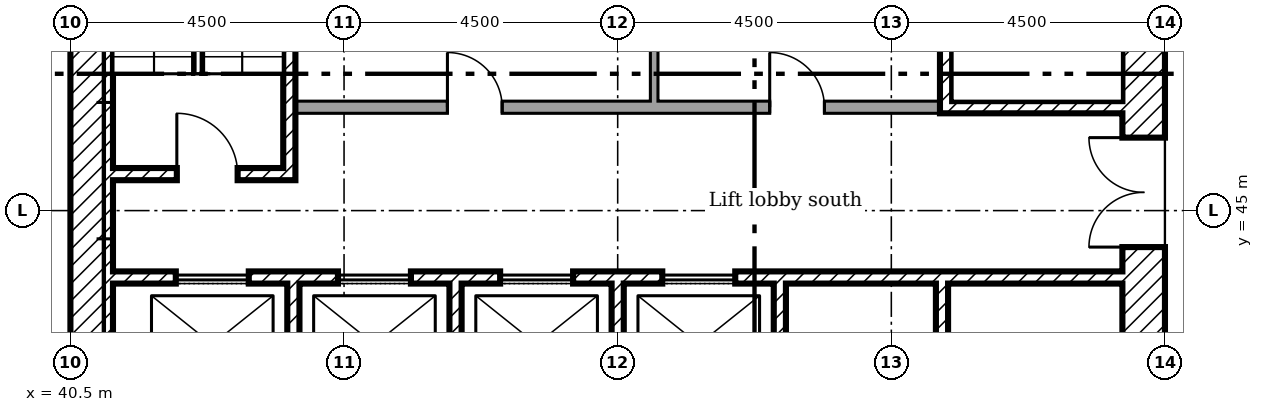
"""IFC4 building model, lengths in metres.
Left out: names, types, materials, properties, quantities, classifications, styles, units other than length and angle.
Written with IfcOpenShell. Run it as: python <this file> out.ifc"""

import sys

from ifc_helpers import new_model, si_unit, direction, frame, frame_2d, origin, place, context, subcontext, project, spatial, rectangle, extrude, element, fill, save


model = new_model("IFC4")
c1 = context("Model", 3, precision=1e-05, world=origin(), true_north=direction((0.0, 1.0)))
c2 = subcontext(c1, "Body", "Model", "MODEL_VIEW")
j1 = project(units=[si_unit("LENGTHUNIT", "METRE"), si_unit("PLANEANGLEUNIT", "RADIAN")], contexts=[c1])
p1 = place(None, origin())
s1 = spatial("IfcSite", under=j1, at=p1, CompositionType="ELEMENT")
p2 = place(p1, origin())
s2 = spatial("IfcBuilding", under=s1, at=p2, CompositionType="ELEMENT")
p3 = place(p2, frame((0.0, 0.0, 120.8)))
s3 = spatial("IfcBuildingStorey", under=s2, at=p3, CompositionType="ELEMENT", Elevation=120.8)
p4 = place(p3, frame((58.15, 40.5, 0.0), z_axis=(0.0, 0.0, 1.0), x_axis=(0.0, 1.0, 0.0)))
e1 = element("IfcWall", 1, at=p4, inside=s3, PredefinedType="SHEAR", context=c2, shape_type="SweptSolid", body=[
    extrude(rectangle(XDim=18.0, YDim=0.7, at=frame_2d((9.0, 0.0))), origin(), (0.0, 0.0, 1.0), 3.35),
])
p5 = place(p4, frame((13.15, 0.0, 0.0)))
e2 = element("IfcOpeningElement", 2, at=p5, cuts=e1, PredefinedType="OPENING", context=c2, shape_type="SweptSolid", body=[
    extrude(rectangle(XDim=1.2, YDim=2.1, at=frame_2d((0.6, 1.05))), frame((0.0, 0.36, 0.0), z_axis=(0.0, -1.0, 0.0), x_axis=(1.0, 0.0, 0.0)), (0.0, 0.0, 1.0), 0.72),
])
p6 = place(p4, frame((3.9, 0.0, 0.0)))
e3 = element("IfcOpeningElement", 3, at=p6, cuts=e1, PredefinedType="OPENING", context=c2, shape_type="SweptSolid", body=[
    extrude(rectangle(XDim=1.8, YDim=2.1, at=frame_2d((0.9, 1.05))), frame((0.0, 0.36, 0.0), z_axis=(0.0, -1.0, 0.0), x_axis=(1.0, 0.0, 0.0)), (0.0, 0.0, 1.0), 0.72),
])
p7 = place(p4, frame((11.525, 0.0, 0.0)))
e4 = element("IfcOpeningElement", 4, at=p7, cuts=e1, PredefinedType="OPENING", context=c2, shape_type="SweptSolid", body=[
    extrude(rectangle(XDim=1.0, YDim=2.1, at=frame_2d((0.5, 1.05))), frame((0.0, 0.36, 0.0), z_axis=(0.0, -1.0, 0.0), x_axis=(1.0, 0.0, 0.0)), (0.0, 0.0, 1.0), 0.72),
])
p8 = place(p3, frame((40.85, 40.5, 0.0), z_axis=(0.0, 0.0, 1.0), x_axis=(0.0, 1.0, 0.0)))
e5 = element("IfcWall", 5, at=p8, inside=s3, PredefinedType="SHEAR", context=c2, shape_type="SweptSolid", body=[
    extrude(rectangle(XDim=18.0, YDim=0.7, at=frame_2d((9.0, 0.0))), origin(), (0.0, 0.0, 1.0), 3.35),
])
for number, where, z_axis, x_axis in (
    (6, (44.167, 41.2, 0.0), (0.0, 0.0, 1.0), (0.0, 1.0, 0.0)),
    (7, (46.833, 41.2, 0.0), (0.0, 0.0, 1.0), (0.0, 1.0, 0.0)),
    (8, (49.5, 41.2, 0.0), (0.0, 0.0, 1.0), (0.0, 1.0, 0.0)),
    (9, (52.167, 41.2, 0.0), (0.0, 0.0, 1.0), (0.0, 1.0, 0.0)),
    (10, (54.833, 41.2, 0.0), (0.0, 0.0, 1.0), (0.0, 1.0, 0.0)),
):
    element("IfcWall", number, at=place(p3, frame(where, z_axis=z_axis, x_axis=x_axis)), inside=s3, PredefinedType="SHEAR", context=c2, shape_type="SweptSolid", body=[
        extrude(rectangle(XDim=2.6, YDim=0.2, at=frame_2d((1.3, 0.0))), origin(), (0.0, 0.0, 1.0), 3.35),
    ])
p9 = place(p3, frame((41.2, 43.9, 0.0)))
e11 = element("IfcWall", 11, at=p9, inside=s3, PredefinedType="SHEAR", context=c2, shape_type="SweptSolid", body=[
    extrude(rectangle(XDim=16.6, YDim=0.2, at=frame_2d((8.3, 0.0))), origin(), (0.0, 0.0, 1.0), 3.35),
])
p10 = place(p9, frame((1.033, 0.0, 0.0)))
e12 = element("IfcOpeningElement", 12, at=p10, cuts=e11, PredefinedType="OPENING", context=c2, shape_type="SweptSolid", body=[
    extrude(rectangle(XDim=1.2, YDim=2.1, at=frame_2d((0.6, 1.05))), frame((0.0, 0.11, 0.0), z_axis=(0.0, -1.0, 0.0), x_axis=(1.0, 0.0, 0.0)), (0.0, 0.0, 1.0), 0.22),
])
p11 = place(p9, frame((3.7, 0.0, 0.0)))
e13 = element("IfcOpeningElement", 13, at=p11, cuts=e11, PredefinedType="OPENING", context=c2, shape_type="SweptSolid", body=[
    extrude(rectangle(XDim=1.2, YDim=2.1, at=frame_2d((0.6, 1.05))), frame((0.0, 0.11, 0.0), z_axis=(0.0, -1.0, 0.0), x_axis=(1.0, 0.0, 0.0)), (0.0, 0.0, 1.0), 0.22),
])
p12 = place(p9, frame((6.367, 0.0, 0.0)))
e14 = element("IfcOpeningElement", 14, at=p12, cuts=e11, PredefinedType="OPENING", context=c2, shape_type="SweptSolid", body=[
    extrude(rectangle(XDim=1.2, YDim=2.1, at=frame_2d((0.6, 1.05))), frame((0.0, 0.11, 0.0), z_axis=(0.0, -1.0, 0.0), x_axis=(1.0, 0.0, 0.0)), (0.0, 0.0, 1.0), 0.22),
])
p13 = place(p9, frame((9.033, 0.0, 0.0)))
e15 = element("IfcOpeningElement", 15, at=p13, cuts=e11, PredefinedType="OPENING", context=c2, shape_type="SweptSolid", body=[
    extrude(rectangle(XDim=1.2, YDim=2.1, at=frame_2d((0.6, 1.05))), frame((0.0, 0.11, 0.0), z_axis=(0.0, -1.0, 0.0), x_axis=(1.0, 0.0, 0.0)), (0.0, 0.0, 1.0), 0.22),
])
p14 = place(p3, frame((44.1, 45.5, 0.0), z_axis=(0.0, 0.0, 1.0), x_axis=(0.0, 1.0, 0.0)))
e16 = element("IfcWall", 16, at=p14, inside=s3, PredefinedType="SHEAR", context=c2, shape_type="SweptSolid", body=[
    extrude(rectangle(XDim=6.9, YDim=0.2, at=frame_2d((3.45, 0.0))), origin(), (0.0, 0.0, 1.0), 3.35),
])
p15 = place(p3, frame((41.2, 45.6, 0.0)))
e17 = element("IfcWall", 17, at=p15, inside=s3, PredefinedType="SHEAR", context=c2, shape_type="SweptSolid", body=[
    extrude(rectangle(XDim=2.8, YDim=0.2, at=frame_2d((1.4, 0.0))), origin(), (0.0, 0.0, 1.0), 3.35),
])
p16 = place(p15, frame((1.05, 0.0, 0.0)))
e18 = element("IfcOpeningElement", 18, at=p16, cuts=e17, PredefinedType="OPENING", context=c2, shape_type="SweptSolid", body=[
    extrude(rectangle(XDim=1.0, YDim=2.1, at=frame_2d((0.5, 1.05))), frame((0.0, 0.11, 0.0), z_axis=(0.0, -1.0, 0.0), x_axis=(1.0, 0.0, 0.0)), (0.0, 0.0, 1.0), 0.22),
])
p17 = place(p3, frame((54.8, 46.7, 0.0)))
e19 = element("IfcWall", 19, at=p17, inside=s3, PredefinedType="SHEAR", context=c2, shape_type="SweptSolid", body=[
    extrude(rectangle(XDim=3.0, YDim=0.2, at=frame_2d((1.5, 0.0))), origin(), (0.0, 0.0, 1.0), 3.35),
])
p18 = place(p3, frame((54.9, 46.8, 0.0), z_axis=(0.0, 0.0, 1.0), x_axis=(0.0, 1.0, 0.0)))
e20 = element("IfcWall", 20, at=p18, inside=s3, PredefinedType="SHEAR", context=c2, shape_type="SweptSolid", body=[
    extrude(rectangle(XDim=6.5, YDim=0.2, at=frame_2d((3.25, 0.0))), origin(), (0.0, 0.0, 1.0), 3.35),
])
p19 = place(p3, frame((44.2, 46.7, 0.0)))
e21 = element("IfcWall", 21, at=p19, inside=s3, PredefinedType="PARTITIONING", context=c2, shape_type="SweptSolid", body=[
    extrude(rectangle(XDim=10.6, YDim=0.2, at=frame_2d((5.3, 0.0))), origin(), (0.0, 0.0, 1.0), 3.35),
])
p20 = place(p19, frame((2.5, 0.0, 0.0)))
e22 = element("IfcOpeningElement", 22, at=p20, cuts=e21, PredefinedType="OPENING", context=c2, shape_type="SweptSolid", body=[
    extrude(rectangle(XDim=0.9, YDim=2.1, at=frame_2d((0.45, 1.05))), frame((0.0, 0.11, 0.0), z_axis=(0.0, -1.0, 0.0), x_axis=(1.0, 0.0, 0.0)), (0.0, 0.0, 1.0), 0.22),
])
p21 = place(p19, frame((7.8, 0.0, 0.0)))
e23 = element("IfcOpeningElement", 23, at=p21, cuts=e21, PredefinedType="OPENING", context=c2, shape_type="SweptSolid", body=[
    extrude(rectangle(XDim=0.9, YDim=2.1, at=frame_2d((0.45, 1.05))), frame((0.0, 0.11, 0.0), z_axis=(0.0, -1.0, 0.0), x_axis=(1.0, 0.0, 0.0)), (0.0, 0.0, 1.0), 0.22),
])
p22 = place(p3, frame((50.1, 46.8, 0.0), z_axis=(0.0, 0.0, 1.0), x_axis=(0.0, 1.0, 0.0)))
e24 = element("IfcWall", 24, at=p22, inside=s3, PredefinedType="PARTITIONING", context=c2, shape_type="SweptSolid", body=[
    extrude(rectangle(XDim=1.962, YDim=0.125, at=frame_2d((0.981, 0.0))), origin(), (0.0, 0.0, 1.0), 3.35),
])
p23 = place(p6, origin())
e25 = element("IfcDoor", 25, at=p23, inside=s3, OperationType="DOUBLE_DOOR_SINGLE_SWING", PredefinedType="DOOR", context=c2, shape_type="SweptSolid", body=[
    extrude(rectangle(XDim=1.8, YDim=2.1, at=frame_2d((0.9, 1.05))), frame((0.0, 0.025, 0.0), z_axis=(0.0, -1.0, 0.0), x_axis=(1.0, 0.0, 0.0)), (0.0, 0.0, 1.0), 0.05),
])
fill(e3, e25)
p24 = place(p16, origin())
e26 = element("IfcDoor", 26, at=p24, inside=s3, OperationType="SINGLE_SWING_RIGHT", PredefinedType="DOOR", context=c2, shape_type="SweptSolid", body=[
    extrude(rectangle(XDim=1.0, YDim=2.1, at=frame_2d((0.5, 1.05))), frame((0.0, 0.025, 0.0), z_axis=(0.0, -1.0, 0.0), x_axis=(1.0, 0.0, 0.0)), (0.0, 0.0, 1.0), 0.05),
])
fill(e18, e26)
p25 = place(p20, origin())
e27 = element("IfcDoor", 27, at=p25, inside=s3, OperationType="SINGLE_SWING_RIGHT", PredefinedType="DOOR", context=c2, shape_type="SweptSolid", body=[
    extrude(rectangle(XDim=0.9, YDim=2.1, at=frame_2d((0.45, 1.05))), frame((0.0, 0.025, 0.0), z_axis=(0.0, -1.0, 0.0), x_axis=(1.0, 0.0, 0.0)), (0.0, 0.0, 1.0), 0.05),
])
fill(e22, e27)
p26 = place(p21, origin())
e28 = element("IfcDoor", 28, at=p26, inside=s3, OperationType="SINGLE_SWING_RIGHT", PredefinedType="DOOR", context=c2, shape_type="SweptSolid", body=[
    extrude(rectangle(XDim=0.9, YDim=2.1, at=frame_2d((0.45, 1.05))), frame((0.0, 0.025, 0.0), z_axis=(0.0, -1.0, 0.0), x_axis=(1.0, 0.0, 0.0)), (0.0, 0.0, 1.0), 0.05),
])
fill(e23, e28)
p27 = place(p10, origin())
e29 = element("IfcDoor", 29, at=p27, inside=s3, OperationType="SLIDING_TO_LEFT", PredefinedType="DOOR", context=c2, shape_type="SweptSolid", body=[
    extrude(rectangle(XDim=1.2, YDim=2.1, at=frame_2d((0.6, 1.05))), frame((0.0, 0.025, 0.0), z_axis=(0.0, -1.0, 0.0), x_axis=(1.0, 0.0, 0.0)), (0.0, 0.0, 1.0), 0.05),
])
fill(e12, e29)
p28 = place(p11, origin())
e30 = element("IfcDoor", 30, at=p28, inside=s3, OperationType="SLIDING_TO_LEFT", PredefinedType="DOOR", context=c2, shape_type="SweptSolid", body=[
    extrude(rectangle(XDim=1.2, YDim=2.1, at=frame_2d((0.6, 1.05))), frame((0.0, 0.025, 0.0), z_axis=(0.0, -1.0, 0.0), x_axis=(1.0, 0.0, 0.0)), (0.0, 0.0, 1.0), 0.05),
])
fill(e13, e30)
p29 = place(p12, origin())
e31 = element("IfcDoor", 31, at=p29, inside=s3, OperationType="SLIDING_TO_LEFT", PredefinedType="DOOR", context=c2, shape_type="SweptSolid", body=[
    extrude(rectangle(XDim=1.2, YDim=2.1, at=frame_2d((0.6, 1.05))), frame((0.0, 0.025, 0.0), z_axis=(0.0, -1.0, 0.0), x_axis=(1.0, 0.0, 0.0)), (0.0, 0.0, 1.0), 0.05),
])
fill(e14, e31)
p30 = place(p13, origin())
e32 = element("IfcDoor", 32, at=p30, inside=s3, OperationType="SLIDING_TO_LEFT", PredefinedType="DOOR", context=c2, shape_type="SweptSolid", body=[
    extrude(rectangle(XDim=1.2, YDim=2.1, at=frame_2d((0.6, 1.05))), frame((0.0, 0.025, 0.0), z_axis=(0.0, -1.0, 0.0), x_axis=(1.0, 0.0, 0.0)), (0.0, 0.0, 1.0), 0.05),
])
fill(e15, e32)
save(model, sys.argv[1])
